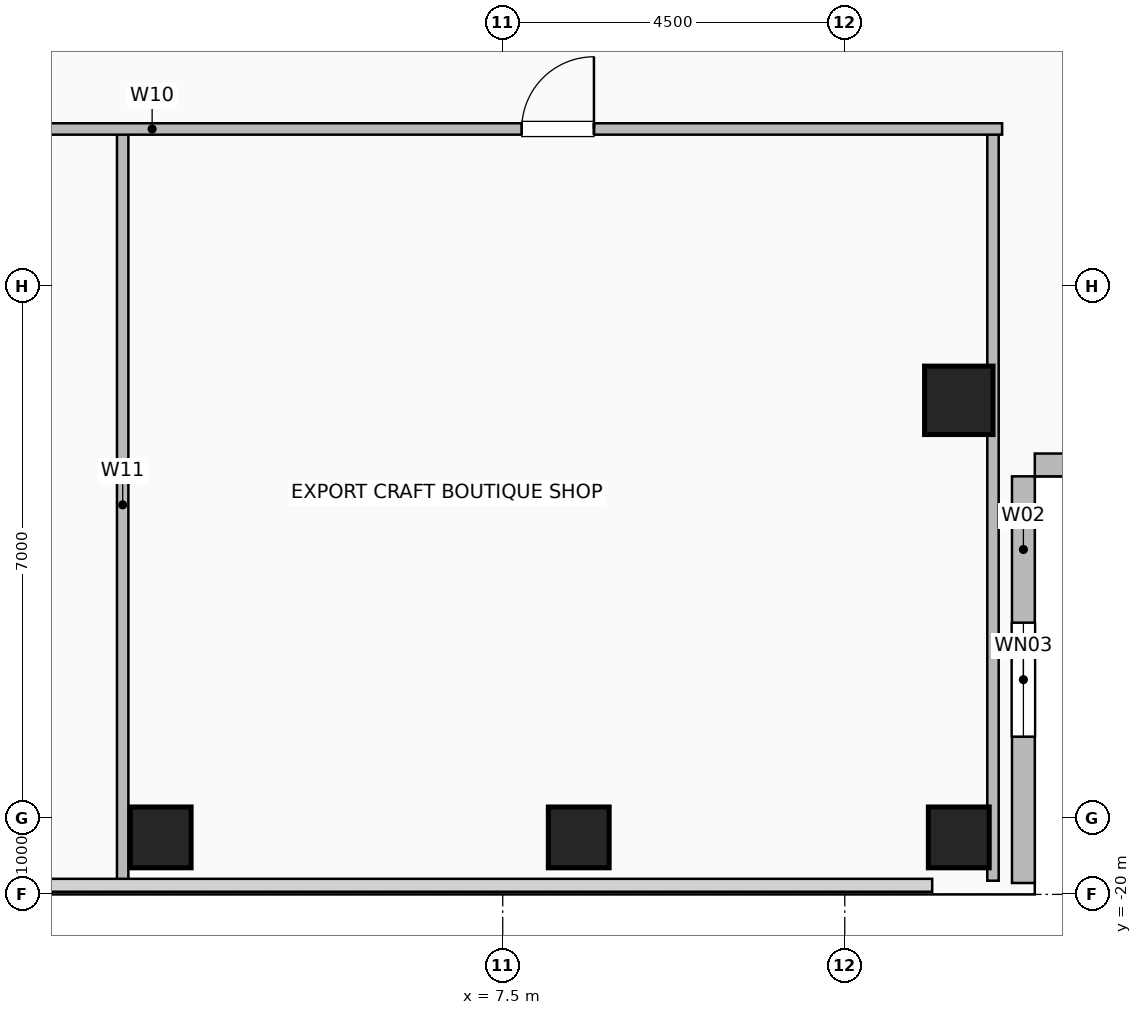
"""IFC4 building model, lengths in metres.
Left out: names, types, materials, properties, quantities, classifications, styles, units other than length and angle.
Written with IfcOpenShell. Run it as: python <this file> out.ifc"""

import sys

from ifc_helpers import new_model, si_unit, direction, frame, frame_2d, origin, origin_2d, place, context, subcontext, project, spatial, rectangle, hollow_rectangle, extrude, element, fill, save


model = new_model("IFC4")
c1 = context("Model", 3, precision=1e-05, world=origin(), true_north=direction((0.0, 1.0)))
c2 = subcontext(c1, "Body", "Model", "MODEL_VIEW")
j1 = project(units=[si_unit("LENGTHUNIT", "METRE"), si_unit("PLANEANGLEUNIT", "RADIAN")], contexts=[c1])
p1 = place(None, origin())
s1 = spatial("IfcSite", under=j1, at=p1, CompositionType="ELEMENT")
p2 = place(p1, origin())
s2 = spatial("IfcBuilding", under=s1, at=p2, CompositionType="ELEMENT")
p3 = place(p2, frame((0.0, 0.0, 220.2)))
s3 = spatial("IfcBuildingStorey", under=s2, at=p3, CompositionType="ELEMENT", Elevation=220.2)
for number, where, z_axis, x_axis in (
    (1, (3.0, -19.25, 0.0), (0.0, 0.0, 1.0), (1.0, 0.0, 0.0)),
    (2, (8.5, -19.25, 0.0), (0.0, 0.0, 1.0), (1.0, 0.0, 0.0)),
    (3, (13.5, -19.25, 0.0), (0.0, 0.0, 1.0), (1.0, 0.0, 0.0)),
):
    element("IfcColumn", number, at=place(p3, frame(where, z_axis=z_axis, x_axis=x_axis)), inside=s3, PredefinedType="COLUMN", context=c2, shape_type="SweptSolid", body=[
        extrude(hollow_rectangle(XDim=0.8, YDim=0.8, WallThickness=0.04, at=origin_2d()), origin(), (0.0, 0.0, 1.0), 3.6),
    ])
p4 = place(p3, frame((13.5, -13.5, 0.0), z_axis=(0.0, 0.0, 1.0), x_axis=(1.0, 0.0, 0.0)))
e4 = element("IfcColumn", 4, at=p4, inside=s3, PredefinedType="COLUMN", context=c2, shape_type="SweptSolid", body=[
    extrude(hollow_rectangle(XDim=0.9, YDim=0.9, WallThickness=0.045, at=origin_2d()), origin(), (0.0, 0.0, 1.0), 3.6),
])
p5 = place(p3, frame((14.35, -19.85, 0.0), z_axis=(0.0, 0.0, 1.0), x_axis=(0.0, 1.0, 0.0)))
e5 = element("IfcWall", 5, at=p5, inside=s3, PredefinedType="SOLIDWALL", context=c2, shape_type="SweptSolid", body=[
    extrude(rectangle(XDim=5.35, YDim=0.3, at=frame_2d((2.675, 0.0))), origin(), (0.0, 0.0, 1.0), 3.36),
])
p6 = place(p5, frame((1.925, 0.0, 0.9)))
e6 = element("IfcOpeningElement", 6, at=p6, cuts=e5, PredefinedType="OPENING", context=c2, shape_type="SweptSolid", body=[
    extrude(rectangle(XDim=1.5, YDim=1.8, at=frame_2d((0.75, 0.9))), frame((0.0, 0.16, 0.0), z_axis=(0.0, -1.0, 0.0), x_axis=(1.0, 0.0, 0.0)), (0.0, 0.0, 1.0), 0.32),
])
p7 = place(p3, frame((19.85, -14.35, 0.0), z_axis=(0.0, 0.0, 1.0), x_axis=(-1.0, 0.0, 0.0)))
e7 = element("IfcWall", 7, at=p7, inside=s3, PredefinedType="SOLIDWALL", context=c2, shape_type="SweptSolid", body=[
    extrude(rectangle(XDim=5.35, YDim=0.3, at=frame_2d((2.675, 0.0))), origin(), (0.0, 0.0, 1.0), 3.36),
])
for number, where, z_axis, x_axis in (
    (8, (2.5, -19.82, 0.0), (0.0, 0.0, 1.0), (0.0, 1.0, 0.0)),
    (9, (13.95, -19.82, 0.0), (0.0, 0.0, 1.0), (0.0, 1.0, 0.0)),
):
    element("IfcWall", number, at=place(p3, frame(where, z_axis=z_axis, x_axis=x_axis)), inside=s3, PredefinedType="PARTITIONING", context=c2, shape_type="SweptSolid", body=[
        extrude(rectangle(XDim=9.89, YDim=0.15, at=frame_2d((4.945, 0.0))), origin(), (0.0, 0.0, 1.0), 3.36),
    ])
p8 = place(p3, frame((-7.52, -9.93, 0.0), z_axis=(0.0, 0.0, 1.0), x_axis=(1.0, 0.0, 0.0)))
e10 = element("IfcWall", 10, at=p8, inside=s3, PredefinedType="PARTITIONING", context=c2, shape_type="SweptSolid", body=[
    extrude(rectangle(XDim=21.59, YDim=0.15, at=frame_2d((10.795, 0.0))), origin(), (0.0, 0.0, 1.0), 3.36),
])
p9 = place(p8, frame((4.595, 0.0, 0.0)))
e11 = element("IfcOpeningElement", 11, at=p9, cuts=e10, PredefinedType="OPENING", context=c2, shape_type="SweptSolid", body=[
    extrude(rectangle(XDim=0.95, YDim=2.06, at=frame_2d((0.475, 1.03))), frame((0.0, 0.085, 0.0), z_axis=(0.0, -1.0, 0.0), x_axis=(1.0, 0.0, 0.0)), (0.0, 0.0, 1.0), 0.17),
])
p10 = place(p8, frame((15.27, 0.0, 0.0)))
e12 = element("IfcOpeningElement", 12, at=p10, cuts=e10, PredefinedType="OPENING", context=c2, shape_type="SweptSolid", body=[
    extrude(rectangle(XDim=0.95, YDim=2.06, at=frame_2d((0.475, 1.03))), frame((0.0, 0.085, 0.0), z_axis=(0.0, -1.0, 0.0), x_axis=(1.0, 0.0, 0.0)), (0.0, 0.0, 1.0), 0.17),
])
p11 = place(p6, origin())
e13 = element("IfcWindow", 13, at=p11, inside=s3, PartitioningType="SINGLE_PANEL", PredefinedType="WINDOW", context=c2, shape_type="SweptSolid", body=[
    extrude(rectangle(XDim=1.5, YDim=1.8, at=frame_2d((0.75, 0.9))), frame((0.0, 0.03, 0.0), z_axis=(0.0, -1.0, 0.0), x_axis=(1.0, 0.0, 0.0)), (0.0, 0.0, 1.0), 0.06),
])
fill(e6, e13)
p12 = place(p10, origin())
e14 = element("IfcDoor", 14, at=p12, inside=s3, OperationType="SINGLE_SWING_RIGHT", PredefinedType="DOOR", context=c2, shape_type="SweptSolid", body=[
    extrude(rectangle(XDim=0.95, YDim=2.06, at=frame_2d((0.475, 1.03))), frame((0.0, 0.025, 0.0), z_axis=(0.0, -1.0, 0.0), x_axis=(1.0, 0.0, 0.0)), (0.0, 0.0, 1.0), 0.05),
])
fill(e12, e14)
save(model, sys.argv[1])
